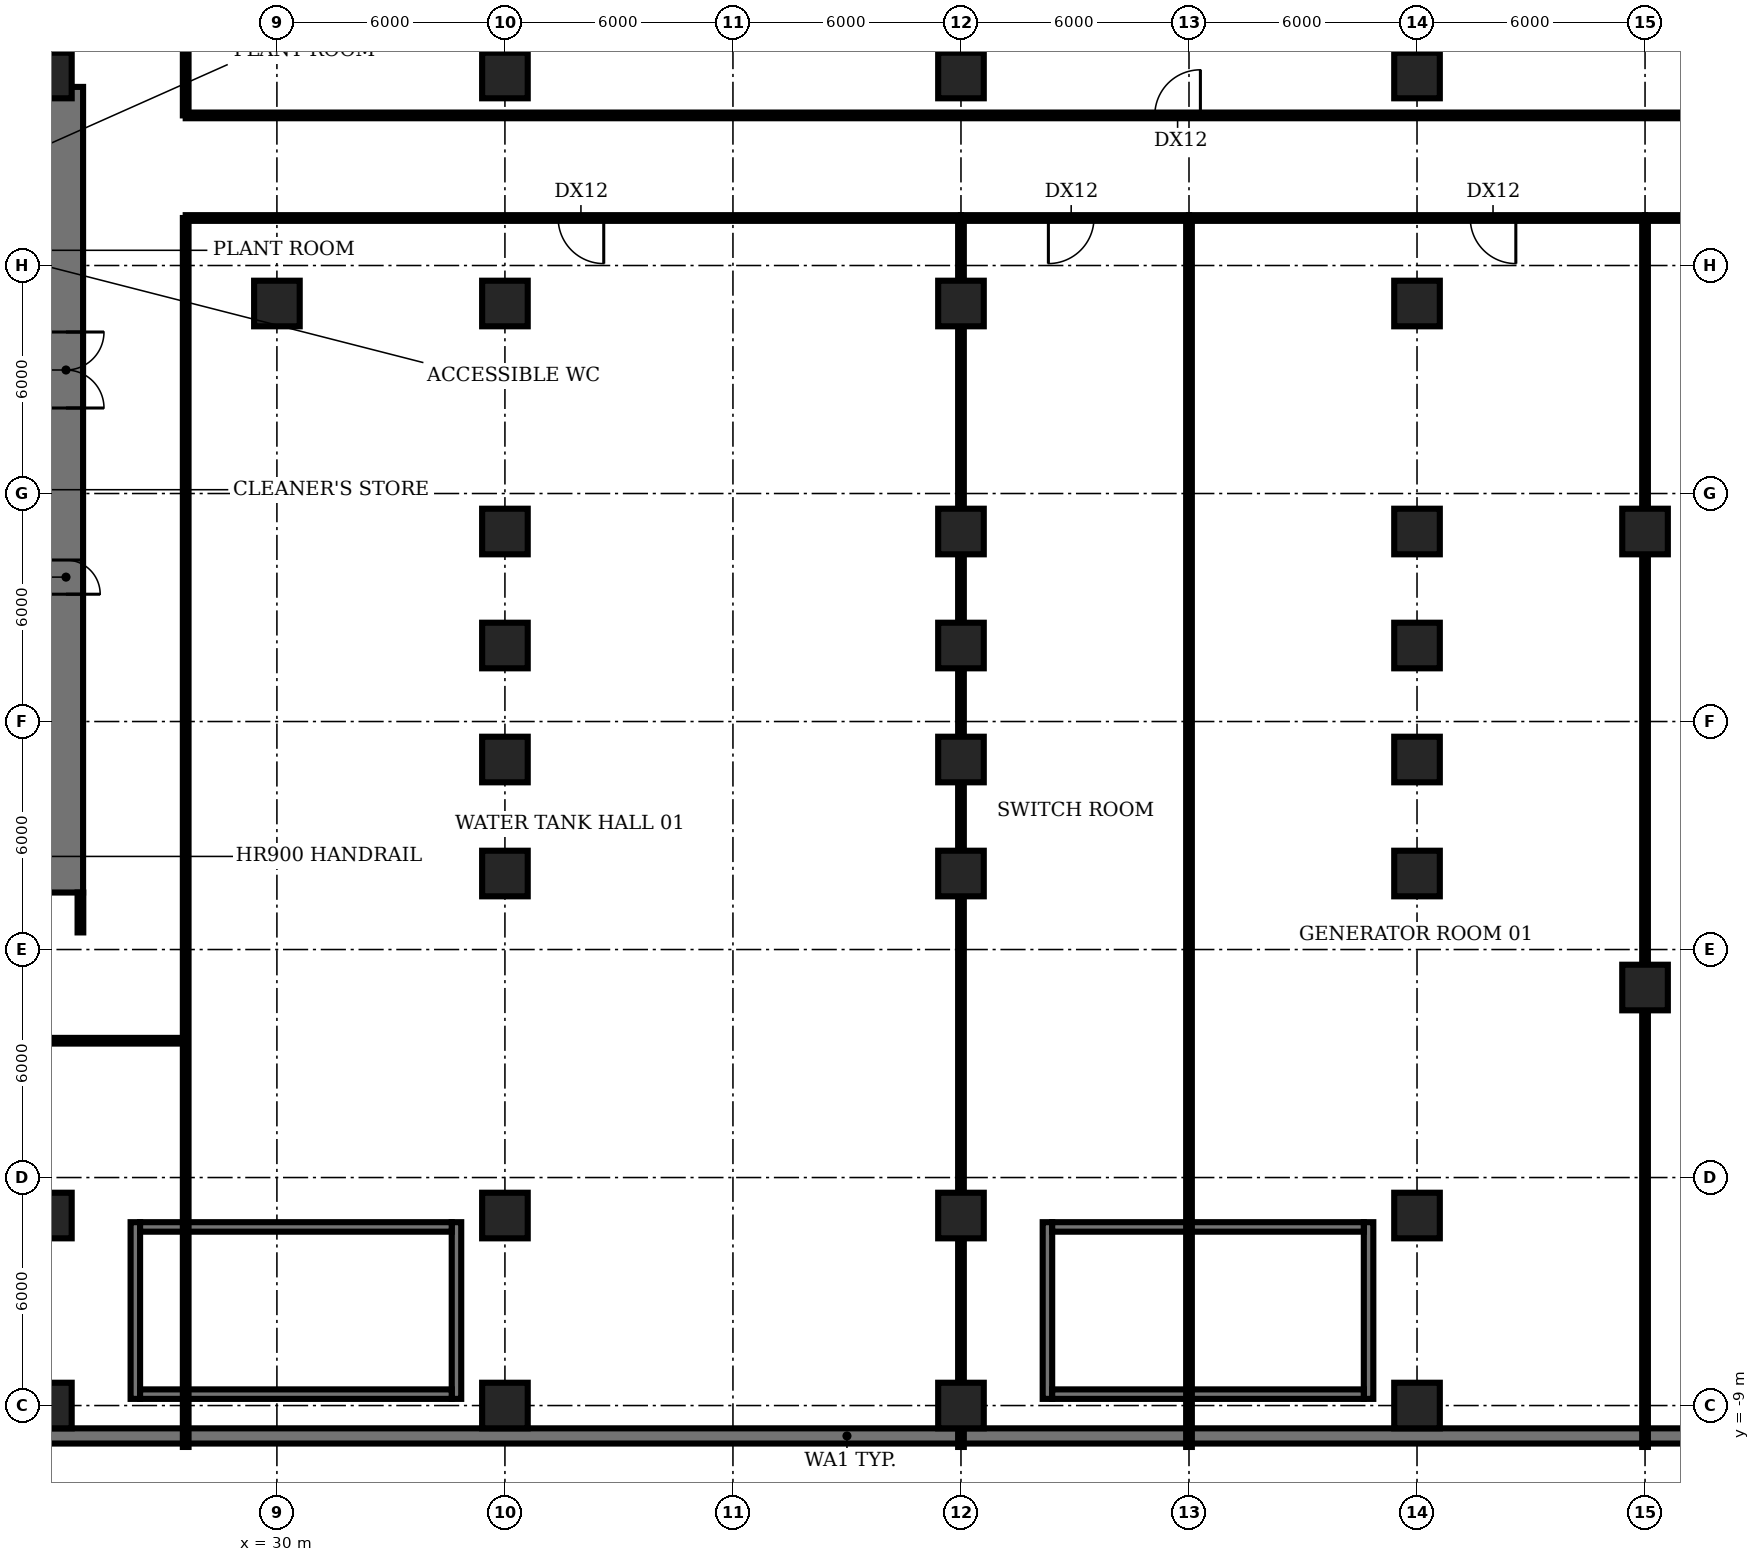
"""IFC4 building model, lengths in metres.
Left out: names, types, materials, properties, quantities, classifications, styles, units other than length and angle.
Written with IfcOpenShell. Run it as: python <this file> out.ifc"""

import sys

from ifc_helpers import new_model, si_unit, direction, frame, frame_2d, origin, origin_2d, place, context, subcontext, project, spatial, rectangle, extrude, element, fill, save


model = new_model("IFC4")
c1 = context("Model", 3, precision=1e-05, world=origin(), true_north=direction((0.0, 1.0)))
c2 = subcontext(c1, "Body", "Model", "MODEL_VIEW")
j1 = project(units=[si_unit("LENGTHUNIT", "METRE"), si_unit("PLANEANGLEUNIT", "RADIAN")], contexts=[c1])
p1 = place(None, origin())
s1 = spatial("IfcSite", under=j1, at=p1, CompositionType="ELEMENT")
p2 = place(p1, origin())
s2 = spatial("IfcBuilding", under=s1, at=p2, CompositionType="ELEMENT")
p3 = place(p2, frame((0.0, 0.0, -6.0)))
s3 = spatial("IfcBuildingStorey", under=s2, at=p3, CompositionType="ELEMENT", Elevation=-6.0)
for number, where, z_axis, x_axis in (
    (1, (24.0, -9.0, -0.3), (0.0, 0.0, 1.0), (1.0, 0.0, 0.0)),
    (2, (24.0, -4.0, -0.3), (0.0, 0.0, 1.0), (1.0, 0.0, 0.0)),
    (3, (24.0, 26.0, -0.3), (0.0, 0.0, 1.0), (1.0, 0.0, 0.0)),
    (4, (30.0, 20.0, -0.3), (0.0, 0.0, 1.0), (1.0, 0.0, 0.0)),
    (5, (36.0, -9.0, -0.3), (0.0, 0.0, 1.0), (1.0, 0.0, 0.0)),
    (6, (36.0, -4.0, -0.3), (0.0, 0.0, 1.0), (1.0, 0.0, 0.0)),
    (7, (36.0, 5.0, -0.3), (0.0, 0.0, 1.0), (1.0, 0.0, 0.0)),
    (8, (36.0, 8.0, -0.3), (0.0, 0.0, 1.0), (1.0, 0.0, 0.0)),
    (9, (36.0, 11.0, -0.3), (0.0, 0.0, 1.0), (1.0, 0.0, 0.0)),
    (10, (36.0, 14.0, -0.3), (0.0, 0.0, 1.0), (1.0, 0.0, 0.0)),
    (11, (36.0, 20.0, -0.3), (0.0, 0.0, 1.0), (1.0, 0.0, 0.0)),
    (12, (36.0, 26.0, -0.3), (0.0, 0.0, 1.0), (1.0, 0.0, 0.0)),
    (13, (48.0, -9.0, -0.3), (0.0, 0.0, 1.0), (1.0, 0.0, 0.0)),
    (14, (48.0, -4.0, -0.3), (0.0, 0.0, 1.0), (1.0, 0.0, 0.0)),
    (15, (48.0, 5.0, -0.3), (0.0, 0.0, 1.0), (1.0, 0.0, 0.0)),
    (16, (48.0, 8.0, -0.3), (0.0, 0.0, 1.0), (1.0, 0.0, 0.0)),
    (17, (48.0, 11.0, -0.3), (0.0, 0.0, 1.0), (1.0, 0.0, 0.0)),
    (18, (48.0, 14.0, -0.3), (0.0, 0.0, 1.0), (1.0, 0.0, 0.0)),
    (19, (48.0, 20.0, -0.3), (0.0, 0.0, 1.0), (1.0, 0.0, 0.0)),
    (20, (48.0, 26.0, -0.3), (0.0, 0.0, 1.0), (1.0, 0.0, 0.0)),
    (21, (60.0, -9.0, -0.3), (0.0, 0.0, 1.0), (1.0, 0.0, 0.0)),
    (22, (60.0, -4.0, -0.3), (0.0, 0.0, 1.0), (1.0, 0.0, 0.0)),
    (23, (60.0, 5.0, -0.3), (0.0, 0.0, 1.0), (1.0, 0.0, 0.0)),
    (24, (60.0, 8.0, -0.3), (0.0, 0.0, 1.0), (1.0, 0.0, 0.0)),
    (25, (60.0, 11.0, -0.3), (0.0, 0.0, 1.0), (1.0, 0.0, 0.0)),
    (26, (60.0, 14.0, -0.3), (0.0, 0.0, 1.0), (1.0, 0.0, 0.0)),
    (27, (60.0, 20.0, -0.3), (0.0, 0.0, 1.0), (1.0, 0.0, 0.0)),
    (28, (60.0, 26.0, -0.3), (0.0, 0.0, 1.0), (1.0, 0.0, 0.0)),
    (29, (66.0, 2.0, -0.3), (0.0, 0.0, 1.0), (1.0, 0.0, 0.0)),
    (30, (66.0, 14.0, -0.3), (0.0, 0.0, 1.0), (1.0, 0.0, 0.0)),
):
    element("IfcColumn", number, at=place(p3, frame(where, z_axis=z_axis, x_axis=x_axis)), inside=s3, PredefinedType="COLUMN", context=c2, shape_type="SweptSolid", body=[
        extrude(rectangle(XDim=1.2, YDim=1.2, at=origin_2d()), origin(), (0.0, 0.0, 1.0), 5.95),
    ])
p4 = place(p3, frame((-0.249, -9.8, 0.0), z_axis=(0.0, 0.0, 1.0), x_axis=(1.0, 0.0, 0.0)))
e31 = element("IfcWall", 31, at=p4, inside=s3, PredefinedType="SOLIDWALL", context=c2, shape_type="SweptSolid", body=[
    extrude(rectangle(XDim=90.497, YDim=0.4, at=frame_2d((45.249, 0.0))), origin(), (0.0, 0.0, 1.0), 5.65),
])
p5 = place(p3, frame((24.45, 25.7, 0.0), z_axis=(0.0, 0.0, 1.0), x_axis=(0.0, -1.0, 0.0)))
e32 = element("IfcWall", 32, at=p5, inside=s3, PredefinedType="SHEAR", context=c2, shape_type="SweptSolid", body=[
    extrude(rectangle(XDim=21.2, YDim=0.9, at=frame_2d((10.6, 0.0))), origin(), (0.0, 0.0, 1.0), 5.65),
])
p6 = place(p5, frame((12.45, 0.0, 0.0)))
e33 = element("IfcOpeningElement", 33, at=p6, cuts=e32, PredefinedType="OPENING", context=c2, shape_type="SweptSolid", body=[
    extrude(rectangle(XDim=0.9, YDim=2.1, at=frame_2d((0.45, 1.05))), frame((0.0, 0.46, 0.0), z_axis=(0.0, -1.0, 0.0), x_axis=(1.0, 0.0, 0.0)), (0.0, 0.0, 1.0), 0.92),
])
p7 = place(p5, frame((6.45, 0.0, 0.0)))
e34 = element("IfcOpeningElement", 34, at=p7, cuts=e32, PredefinedType="OPENING", context=c2, shape_type="SweptSolid", body=[
    extrude(rectangle(XDim=2.0, YDim=2.1, at=frame_2d((1.0, 1.05))), frame((0.0, 0.46, 0.0), z_axis=(0.0, -1.0, 0.0), x_axis=(1.0, 0.0, 0.0)), (0.0, 0.0, 1.0), 0.92),
])
for number, where, z_axis, x_axis in (
    (35, (26.275, -8.825, 0.0), (0.0, 0.0, 1.0), (0.0, 1.0, 0.0)),
    (36, (34.725, -8.825, 0.0), (0.0, 0.0, 1.0), (0.0, 1.0, 0.0)),
):
    element("IfcWall", number, at=place(p3, frame(where, z_axis=z_axis, x_axis=x_axis)), inside=s3, PredefinedType="SHEAR", context=c2, shape_type="SweptSolid", body=[
        extrude(rectangle(XDim=4.65, YDim=0.25, at=frame_2d((2.325, 0.0))), origin(), (0.0, 0.0, 1.0), 5.65),
    ])
for number, where, z_axis, x_axis in (
    (37, (34.6, -8.7, 0.0), (0.0, 0.0, 1.0), (-1.0, 0.0, 0.0)),
    (38, (26.4, -4.3, 0.0), (0.0, 0.0, 1.0), (1.0, 0.0, 0.0)),
):
    element("IfcWall", number, at=place(p3, frame(where, z_axis=z_axis, x_axis=x_axis)), inside=s3, PredefinedType="SHEAR", context=c2, shape_type="SweptSolid", body=[
        extrude(rectangle(XDim=8.2, YDim=0.25, at=frame_2d((4.1, 0.0))), origin(), (0.0, 0.0, 1.0), 5.65),
    ])
for number, where, z_axis, x_axis in (
    (39, (50.275, -8.825, 0.0), (0.0, 0.0, 1.0), (0.0, 1.0, 0.0)),
    (40, (58.725, -8.825, 0.0), (0.0, 0.0, 1.0), (0.0, 1.0, 0.0)),
):
    element("IfcWall", number, at=place(p3, frame(where, z_axis=z_axis, x_axis=x_axis)), inside=s3, PredefinedType="SHEAR", context=c2, shape_type="SweptSolid", body=[
        extrude(rectangle(XDim=4.65, YDim=0.25, at=frame_2d((2.325, 0.0))), origin(), (0.0, 0.0, 1.0), 5.65),
    ])
for number, where, z_axis, x_axis in (
    (41, (58.6, -8.7, 0.0), (0.0, 0.0, 1.0), (-1.0, 0.0, 0.0)),
    (42, (50.4, -4.3, 0.0), (0.0, 0.0, 1.0), (1.0, 0.0, 0.0)),
):
    element("IfcWall", number, at=place(p3, frame(where, z_axis=z_axis, x_axis=x_axis)), inside=s3, PredefinedType="SHEAR", context=c2, shape_type="SweptSolid", body=[
        extrude(rectangle(XDim=8.2, YDim=0.25, at=frame_2d((4.1, 0.0))), origin(), (0.0, 0.0, 1.0), 5.65),
    ])
p8 = place(p3, frame((24.83, 3.45, 0.0), z_axis=(0.0, 0.0, 1.0), x_axis=(0.0, 1.0, 0.0)))
e43 = element("IfcWall", 43, at=p8, inside=s3, PredefinedType="PARTITIONING", context=c2, shape_type="SweptSolid", body=[
    extrude(rectangle(XDim=1.05, YDim=0.15, at=frame_2d((0.525, 0.0))), origin(), (0.0, 0.0, 1.0), 4.7),
])
p9 = place(p3, frame((27.6, -10.09, 0.0), z_axis=(0.0, 0.0, 1.0), x_axis=(0.0, 1.0, 0.0)))
e44 = element("IfcWall", 44, at=p9, inside=s3, PredefinedType="PARTITIONING", context=c2, shape_type="SweptSolid", body=[
    extrude(rectangle(XDim=32.34, YDim=0.15, at=frame_2d((16.17, 0.0))), origin(), (0.0, 0.0, 1.0), 4.7),
])
p10 = place(p3, frame((27.6, 0.6, 0.0), z_axis=(0.0, 0.0, 1.0), x_axis=(-1.0, 0.0, 0.0)))
e45 = element("IfcWall", 45, at=p10, inside=s3, PredefinedType="PARTITIONING", context=c2, shape_type="SweptSolid", body=[
    extrude(rectangle(XDim=25.2, YDim=0.15, at=frame_2d((12.6, 0.0))), origin(), (0.0, 0.0, 1.0), 4.7),
])
p11 = place(p10, frame((12.1, 0.0, 0.0)))
e46 = element("IfcOpeningElement", 46, at=p11, cuts=e45, PredefinedType="OPENING", context=c2, shape_type="SweptSolid", body=[
    extrude(rectangle(XDim=0.9, YDim=2.1, at=frame_2d((0.45, 1.05))), frame((0.0, 0.085, 0.0), z_axis=(0.0, -1.0, 0.0), x_axis=(1.0, 0.0, 0.0)), (0.0, 0.0, 1.0), 0.17),
])
p12 = place(p3, frame((27.6, 24.95, 0.0), z_axis=(0.0, 0.0, 1.0), x_axis=(0.0, 1.0, 0.0)))
e47 = element("IfcWall", 47, at=p12, inside=s3, PredefinedType="PARTITIONING", context=c2, shape_type="SweptSolid", body=[
    extrude(rectangle(XDim=45.14, YDim=0.15, at=frame_2d((22.57, 0.0))), origin(), (0.0, 0.0, 1.0), 4.7),
])
p13 = place(p3, frame((27.6, 24.95, 0.0), z_axis=(0.0, 0.0, 1.0), x_axis=(1.0, 0.0, 0.0)))
e48 = element("IfcWall", 48, at=p13, inside=s3, PredefinedType="PARTITIONING", context=c2, shape_type="SweptSolid", body=[
    extrude(rectangle(XDim=52.4, YDim=0.15, at=frame_2d((26.2, 0.0))), origin(), (0.0, 0.0, 1.0), 4.7),
])
p14 = place(p13, frame((25.5, 0.0, 0.0)))
e49 = element("IfcOpeningElement", 49, at=p14, cuts=e48, PredefinedType="OPENING", context=c2, shape_type="SweptSolid", body=[
    extrude(rectangle(XDim=1.2, YDim=2.1, at=frame_2d((0.6, 1.05))), frame((0.0, 0.085, 0.0), z_axis=(0.0, -1.0, 0.0), x_axis=(1.0, 0.0, 0.0)), (0.0, 0.0, 1.0), 0.17),
])
p15 = place(p3, frame((48.0, -10.09, 0.0), z_axis=(0.0, 0.0, 1.0), x_axis=(0.0, 1.0, 0.0)))
e50 = element("IfcWall", 50, at=p15, inside=s3, PredefinedType="PARTITIONING", context=c2, shape_type="SweptSolid", body=[
    extrude(rectangle(XDim=32.34, YDim=0.15, at=frame_2d((16.17, 0.0))), origin(), (0.0, 0.0, 1.0), 4.7),
])
p16 = place(p3, frame((48.0, 22.25, 0.0), z_axis=(0.0, 0.0, 1.0), x_axis=(-1.0, 0.0, 0.0)))
e51 = element("IfcWall", 51, at=p16, inside=s3, PredefinedType="PARTITIONING", context=c2, shape_type="SweptSolid", body=[
    extrude(rectangle(XDim=20.4, YDim=0.15, at=frame_2d((10.2, 0.0))), origin(), (0.0, 0.0, 1.0), 4.7),
])
p17 = place(p16, frame((9.4, 0.0, 0.0)))
e52 = element("IfcOpeningElement", 52, at=p17, cuts=e51, PredefinedType="OPENING", context=c2, shape_type="SweptSolid", body=[
    extrude(rectangle(XDim=1.2, YDim=2.1, at=frame_2d((0.6, 1.05))), frame((0.0, 0.085, 0.0), z_axis=(0.0, -1.0, 0.0), x_axis=(1.0, 0.0, 0.0)), (0.0, 0.0, 1.0), 0.17),
])
p18 = place(p3, frame((54.0, -10.09, 0.0), z_axis=(0.0, 0.0, 1.0), x_axis=(0.0, 1.0, 0.0)))
e53 = element("IfcWall", 53, at=p18, inside=s3, PredefinedType="PARTITIONING", context=c2, shape_type="SweptSolid", body=[
    extrude(rectangle(XDim=32.34, YDim=0.15, at=frame_2d((16.17, 0.0))), origin(), (0.0, 0.0, 1.0), 4.7),
])
p19 = place(p3, frame((54.0, 22.25, 0.0), z_axis=(0.0, 0.0, 1.0), x_axis=(-1.0, 0.0, 0.0)))
e54 = element("IfcWall", 54, at=p19, inside=s3, PredefinedType="PARTITIONING", context=c2, shape_type="SweptSolid", body=[
    extrude(rectangle(XDim=6.0, YDim=0.15, at=frame_2d((3.0, 0.0))), origin(), (0.0, 0.0, 1.0), 4.7),
])
p20 = place(p19, frame((2.5, 0.0, 0.0)))
e55 = element("IfcOpeningElement", 55, at=p20, cuts=e54, PredefinedType="OPENING", context=c2, shape_type="SweptSolid", body=[
    extrude(rectangle(XDim=1.2, YDim=2.1, at=frame_2d((0.6, 1.05))), frame((0.0, 0.085, 0.0), z_axis=(0.0, -1.0, 0.0), x_axis=(1.0, 0.0, 0.0)), (0.0, 0.0, 1.0), 0.17),
])
p21 = place(p3, frame((66.0, -10.09, 0.0), z_axis=(0.0, 0.0, 1.0), x_axis=(0.0, 1.0, 0.0)))
e56 = element("IfcWall", 56, at=p21, inside=s3, PredefinedType="PARTITIONING", context=c2, shape_type="SweptSolid", body=[
    extrude(rectangle(XDim=32.34, YDim=0.15, at=frame_2d((16.17, 0.0))), origin(), (0.0, 0.0, 1.0), 4.7),
])
p22 = place(p3, frame((66.0, 22.25, 0.0), z_axis=(0.0, 0.0, 1.0), x_axis=(-1.0, 0.0, 0.0)))
e57 = element("IfcWall", 57, at=p22, inside=s3, PredefinedType="PARTITIONING", context=c2, shape_type="SweptSolid", body=[
    extrude(rectangle(XDim=12.0, YDim=0.15, at=frame_2d((6.0, 0.0))), origin(), (0.0, 0.0, 1.0), 4.7),
])
p23 = place(p22, frame((3.4, 0.0, 0.0)))
e58 = element("IfcOpeningElement", 58, at=p23, cuts=e57, PredefinedType="OPENING", context=c2, shape_type="SweptSolid", body=[
    extrude(rectangle(XDim=1.2, YDim=2.1, at=frame_2d((0.6, 1.05))), frame((0.0, 0.085, 0.0), z_axis=(0.0, -1.0, 0.0), x_axis=(1.0, 0.0, 0.0)), (0.0, 0.0, 1.0), 0.17),
])
p24 = place(p3, frame((80.0, 22.25, 0.0), z_axis=(0.0, 0.0, 1.0), x_axis=(-1.0, 0.0, 0.0)))
e59 = element("IfcWall", 59, at=p24, inside=s3, PredefinedType="PARTITIONING", context=c2, shape_type="SweptSolid", body=[
    extrude(rectangle(XDim=14.0, YDim=0.15, at=frame_2d((7.0, 0.0))), origin(), (0.0, 0.0, 1.0), 4.7),
])
p25 = place(p24, frame((5.4, 0.0, 0.0)))
e60 = element("IfcOpeningElement", 60, at=p25, cuts=e59, PredefinedType="OPENING", context=c2, shape_type="SweptSolid", body=[
    extrude(rectangle(XDim=0.9, YDim=2.1, at=frame_2d((0.45, 1.05))), frame((0.0, 0.085, 0.0), z_axis=(0.0, -1.0, 0.0), x_axis=(1.0, 0.0, 0.0)), (0.0, 0.0, 1.0), 0.17),
])
p26 = place(p7, origin())
e61 = element("IfcDoor", 61, at=p26, inside=s3, OperationType="DOUBLE_DOOR_SINGLE_SWING", PredefinedType="DOOR", context=c2, shape_type="SweptSolid", body=[
    extrude(rectangle(XDim=2.0, YDim=2.1, at=frame_2d((1.0, 1.05))), frame((0.0, 0.025, 0.0), z_axis=(0.0, -1.0, 0.0), x_axis=(1.0, 0.0, 0.0)), (0.0, 0.0, 1.0), 0.05),
])
fill(e34, e61)
p27 = place(p14, origin())
e62 = element("IfcDoor", 62, at=p27, inside=s3, OperationType="SINGLE_SWING_RIGHT", PredefinedType="DOOR", context=c2, shape_type="SweptSolid", body=[
    extrude(rectangle(XDim=1.2, YDim=2.1, at=frame_2d((0.6, 1.05))), frame((0.0, 0.025, 0.0), z_axis=(0.0, -1.0, 0.0), x_axis=(1.0, 0.0, 0.0)), (0.0, 0.0, 1.0), 0.05),
])
fill(e49, e62)
p28 = place(p17, origin())
e63 = element("IfcDoor", 63, at=p28, inside=s3, OperationType="SINGLE_SWING_LEFT", PredefinedType="DOOR", context=c2, shape_type="SweptSolid", body=[
    extrude(rectangle(XDim=1.2, YDim=2.1, at=frame_2d((0.6, 1.05))), frame((0.0, 0.025, 0.0), z_axis=(0.0, -1.0, 0.0), x_axis=(1.0, 0.0, 0.0)), (0.0, 0.0, 1.0), 0.05),
])
fill(e52, e63)
p29 = place(p20, origin())
e64 = element("IfcDoor", 64, at=p29, inside=s3, OperationType="SINGLE_SWING_RIGHT", PredefinedType="DOOR", context=c2, shape_type="SweptSolid", body=[
    extrude(rectangle(XDim=1.2, YDim=2.1, at=frame_2d((0.6, 1.05))), frame((0.0, 0.025, 0.0), z_axis=(0.0, -1.0, 0.0), x_axis=(1.0, 0.0, 0.0)), (0.0, 0.0, 1.0), 0.05),
])
fill(e55, e64)
p30 = place(p23, origin())
e65 = element("IfcDoor", 65, at=p30, inside=s3, OperationType="SINGLE_SWING_LEFT", PredefinedType="DOOR", context=c2, shape_type="SweptSolid", body=[
    extrude(rectangle(XDim=1.2, YDim=2.1, at=frame_2d((0.6, 1.05))), frame((0.0, 0.025, 0.0), z_axis=(0.0, -1.0, 0.0), x_axis=(1.0, 0.0, 0.0)), (0.0, 0.0, 1.0), 0.05),
])
fill(e58, e65)
save(model, sys.argv[1])
